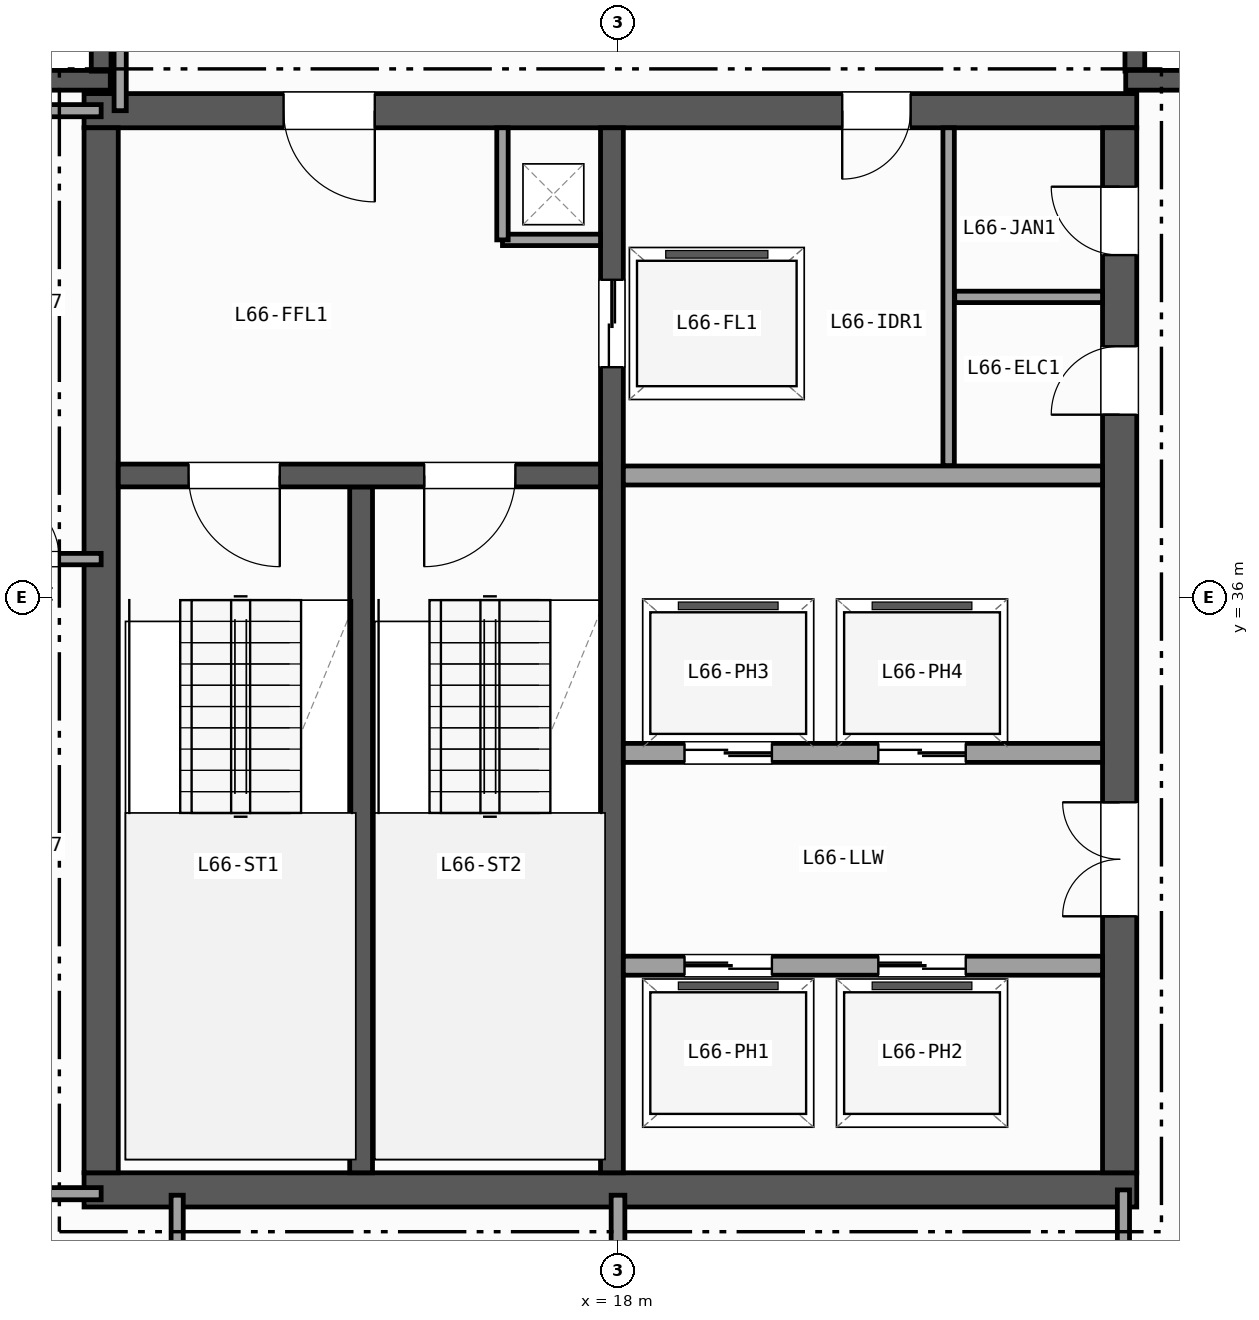
"""IFC4 building model, lengths in metres.
Left out: names, types, materials, properties, quantities, classifications, styles, units other than length and angle.
Written with IfcOpenShell. Run it as: python <this file> out.ifc"""

import sys

from ifc_helpers import new_model, si_unit, direction, frame, frame_2d, origin, place, context, subcontext, project, spatial, rectangle, extrude, element, fill, save


model = new_model("IFC4")
c1 = context("Model", 3, precision=1e-05, world=origin(), true_north=direction((0.0, 1.0)))
c2 = subcontext(c1, "Body", "Model", "MODEL_VIEW")
j1 = project(units=[si_unit("LENGTHUNIT", "METRE"), si_unit("PLANEANGLEUNIT", "RADIAN")], contexts=[c1])
p1 = place(None, origin())
s1 = spatial("IfcSite", under=j1, at=p1, CompositionType="ELEMENT")
p2 = place(p1, origin())
s2 = spatial("IfcBuilding", under=s1, at=p2, CompositionType="ELEMENT")
p3 = place(p2, frame((0.0, 0.0, 263.0)))
s3 = spatial("IfcBuildingStorey", under=s2, at=p3, CompositionType="ELEMENT", Elevation=263.0)
p4 = place(p3, frame((9.0, 42.8, 0.0), z_axis=(0.0, 0.0, 1.0), x_axis=(1.0, 0.0, 0.0)))
e1 = element("IfcWall", 1, at=p4, inside=s3, PredefinedType="SOLIDWALL", context=c2, shape_type="SweptSolid", body=[
    extrude(rectangle(XDim=2.32, YDim=0.26, at=frame_2d((1.16, 0.0))), origin(), (0.0, 0.0, 1.0), 3.42),
])
for number, where, z_axis, x_axis in (
    (2, (11.2, 42.92, 0.0), (0.0, 0.0, 1.0), (0.0, 1.0, 0.0)),
    (3, (24.8, 45.0, 0.0), (0.0, 0.0, 1.0), (0.0, -1.0, 0.0)),
):
    element("IfcWall", number, at=place(p3, frame(where, z_axis=z_axis, x_axis=x_axis)), inside=s3, PredefinedType="SOLIDWALL", context=c2, shape_type="SweptSolid", body=[
        extrude(rectangle(XDim=2.08, YDim=0.26, at=frame_2d((1.04, 0.0))), origin(), (0.0, 0.0, 1.0), 3.42),
    ])
p5 = place(p3, frame((24.68, 42.8, 0.0), z_axis=(0.0, 0.0, 1.0), x_axis=(1.0, 0.0, 0.0)))
e4 = element("IfcWall", 4, at=p5, inside=s3, PredefinedType="SOLIDWALL", context=c2, shape_type="SweptSolid", body=[
    extrude(rectangle(XDim=2.32, YDim=0.26, at=frame_2d((1.16, 0.0))), origin(), (0.0, 0.0, 1.0), 3.42),
])
p6 = place(p3, frame((10.975, 28.2, 0.0), z_axis=(0.0, 0.0, 1.0), x_axis=(1.0, 0.0, 0.0)))
e5 = element("IfcWall", 5, at=p6, inside=s3, PredefinedType="SHEAR", context=c2, shape_type="SweptSolid", body=[
    extrude(rectangle(XDim=13.85, YDim=0.45, at=frame_2d((6.925, 0.0))), origin(), (0.0, 0.0, 1.0), 3.42),
])
p7 = place(p3, frame((24.825, 42.4, 0.0), z_axis=(0.0, 0.0, 1.0), x_axis=(-1.0, 0.0, 0.0)))
e6 = element("IfcWall", 6, at=p7, inside=s3, PredefinedType="SHEAR", context=c2, shape_type="SweptSolid", body=[
    extrude(rectangle(XDim=13.85, YDim=0.45, at=frame_2d((6.925, 0.0))), origin(), (0.0, 0.0, 1.0), 3.42),
])
p8 = place(p7, frame((10.025, 0.0, 0.0)))
e7 = element("IfcOpeningElement", 7, at=p8, cuts=e6, PredefinedType="OPENING", context=c2, shape_type="SweptSolid", body=[
    extrude(rectangle(XDim=1.2, YDim=2.15, at=frame_2d((0.6, 1.075))), frame((0.0, 0.235, 0.0), z_axis=(0.0, -1.0, 0.0), x_axis=(1.0, 0.0, 0.0)), (0.0, 0.0, 1.0), 0.47),
])
p9 = place(p7, frame((2.975, 0.0, 0.0)))
e8 = element("IfcOpeningElement", 8, at=p9, cuts=e6, PredefinedType="OPENING", context=c2, shape_type="SweptSolid", body=[
    extrude(rectangle(XDim=0.9, YDim=2.1, at=frame_2d((0.45, 1.05))), frame((0.0, 0.235, 0.0), z_axis=(0.0, -1.0, 0.0), x_axis=(1.0, 0.0, 0.0)), (0.0, 0.0, 1.0), 0.47),
])
p10 = place(p3, frame((11.2, 42.175, 0.0), z_axis=(0.0, 0.0, 1.0), x_axis=(0.0, -1.0, 0.0)))
e9 = element("IfcWall", 9, at=p10, inside=s3, PredefinedType="SHEAR", context=c2, shape_type="SweptSolid", body=[
    extrude(rectangle(XDim=13.75, YDim=0.45, at=frame_2d((6.875, 0.0))), origin(), (0.0, 0.0, 1.0), 3.42),
])
p11 = place(p3, frame((24.6, 28.425, 0.0), z_axis=(0.0, 0.0, 1.0), x_axis=(0.0, 1.0, 0.0)))
e10 = element("IfcWall", 10, at=p11, inside=s3, PredefinedType="SHEAR", context=c2, shape_type="SweptSolid", body=[
    extrude(rectangle(XDim=13.75, YDim=0.45, at=frame_2d((6.875, 0.0))), origin(), (0.0, 0.0, 1.0), 3.42),
])
p12 = place(p11, frame((3.375, 0.0, 0.0)))
e11 = element("IfcOpeningElement", 11, at=p12, cuts=e10, PredefinedType="OPENING", context=c2, shape_type="SweptSolid", body=[
    extrude(rectangle(XDim=1.5, YDim=2.2, at=frame_2d((0.75, 1.1))), frame((0.0, 0.235, 0.0), z_axis=(0.0, -1.0, 0.0), x_axis=(1.0, 0.0, 0.0)), (0.0, 0.0, 1.0), 0.47),
])
p13 = place(p11, frame((9.975, 0.0, 0.0)))
e12 = element("IfcOpeningElement", 12, at=p13, cuts=e10, PredefinedType="OPENING", context=c2, shape_type="SweptSolid", body=[
    extrude(rectangle(XDim=0.9, YDim=2.1, at=frame_2d((0.45, 1.05))), frame((0.0, 0.235, 0.0), z_axis=(0.0, -1.0, 0.0), x_axis=(1.0, 0.0, 0.0)), (0.0, 0.0, 1.0), 0.47),
])
p14 = place(p11, frame((12.075, 0.0, 0.0)))
e13 = element("IfcOpeningElement", 13, at=p14, cuts=e10, PredefinedType="OPENING", context=c2, shape_type="SweptSolid", body=[
    extrude(rectangle(XDim=0.9, YDim=2.1, at=frame_2d((0.45, 1.05))), frame((0.0, 0.235, 0.0), z_axis=(0.0, -1.0, 0.0), x_axis=(1.0, 0.0, 0.0)), (0.0, 0.0, 1.0), 0.47),
])
p15 = place(p3, frame((14.62, 28.425, 0.0), z_axis=(0.0, 0.0, 1.0), x_axis=(0.0, 1.0, 0.0)))
e14 = element("IfcWall", 14, at=p15, inside=s3, PredefinedType="SHEAR", context=c2, shape_type="SweptSolid", body=[
    extrude(rectangle(XDim=9.025, YDim=0.3, at=frame_2d((4.512, 0.0))), origin(), (0.0, 0.0, 1.0), 3.42),
])
p16 = place(p3, frame((17.92, 42.175, 0.0), z_axis=(0.0, 0.0, 1.0), x_axis=(0.0, -1.0, 0.0)))
e15 = element("IfcWall", 15, at=p16, inside=s3, PredefinedType="SHEAR", context=c2, shape_type="SweptSolid", body=[
    extrude(rectangle(XDim=13.75, YDim=0.3, at=frame_2d((6.875, 0.0))), origin(), (0.0, 0.0, 1.0), 3.42),
])
p17 = place(p16, frame((2.0, 0.0, 0.0)))
e16 = element("IfcOpeningElement", 16, at=p17, cuts=e15, PredefinedType="OPENING", context=c2, shape_type="SweptSolid", body=[
    extrude(rectangle(XDim=1.15, YDim=2.15, at=frame_2d((0.575, 1.075))), frame((0.0, 0.16, 0.0), z_axis=(0.0, -1.0, 0.0), x_axis=(1.0, 0.0, 0.0)), (0.0, 0.0, 1.0), 0.32),
])
p18 = place(p3, frame((17.77, 37.6, 0.0), z_axis=(0.0, 0.0, 1.0), x_axis=(-1.0, 0.0, 0.0)))
e17 = element("IfcWall", 17, at=p18, inside=s3, PredefinedType="SHEAR", context=c2, shape_type="SweptSolid", body=[
    extrude(rectangle(XDim=6.345, YDim=0.3, at=frame_2d((3.172, 0.0))), origin(), (0.0, 0.0, 1.0), 3.42),
])
p19 = place(p18, frame((4.22, 0.0, 0.0)))
e18 = element("IfcOpeningElement", 18, at=p19, cuts=e17, PredefinedType="OPENING", context=c2, shape_type="SweptSolid", body=[
    extrude(rectangle(XDim=1.2, YDim=2.15, at=frame_2d((0.6, 1.075))), frame((0.0, 0.16, 0.0), z_axis=(0.0, -1.0, 0.0), x_axis=(1.0, 0.0, 0.0)), (0.0, 0.0, 1.0), 0.32),
])
p20 = place(p18, frame((1.12, 0.0, 0.0)))
e19 = element("IfcOpeningElement", 19, at=p20, cuts=e17, PredefinedType="OPENING", context=c2, shape_type="SweptSolid", body=[
    extrude(rectangle(XDim=1.2, YDim=2.15, at=frame_2d((0.6, 1.075))), frame((0.0, 0.16, 0.0), z_axis=(0.0, -1.0, 0.0), x_axis=(1.0, 0.0, 0.0)), (0.0, 0.0, 1.0), 0.32),
])
p21 = place(p3, frame((16.48, 40.7, 0.0), z_axis=(0.0, 0.0, 1.0), x_axis=(1.0, 0.0, 0.0)))
e20 = element("IfcWall", 20, at=p21, inside=s3, PredefinedType="PARTITIONING", context=c2, shape_type="SweptSolid", body=[
    extrude(rectangle(XDim=1.29, YDim=0.15, at=frame_2d((0.645, 0.0))), origin(), (0.0, 0.0, 1.0), 3.42),
])
p22 = place(p3, frame((16.48, 40.7, 0.0), z_axis=(0.0, 0.0, 1.0), x_axis=(0.0, 1.0, 0.0)))
e21 = element("IfcWall", 21, at=p22, inside=s3, PredefinedType="PARTITIONING", context=c2, shape_type="SweptSolid", body=[
    extrude(rectangle(XDim=1.475, YDim=0.15, at=frame_2d((0.738, 0.0))), origin(), (0.0, 0.0, 1.0), 3.42),
])
p23 = place(p3, frame((18.07, 37.6, 0.0), z_axis=(0.0, 0.0, 1.0), x_axis=(1.0, 0.0, 0.0)))
e22 = element("IfcWall", 22, at=p23, inside=s3, PredefinedType="PARTITIONING", context=c2, shape_type="SweptSolid", body=[
    extrude(rectangle(XDim=6.305, YDim=0.25, at=frame_2d((3.152, 0.0))), origin(), (0.0, 0.0, 1.0), 3.42),
])
p24 = place(p3, frame((18.07, 31.15, 0.0), z_axis=(0.0, 0.0, 1.0), x_axis=(1.0, 0.0, 0.0)))
e23 = element("IfcWall", 23, at=p24, inside=s3, PredefinedType="PARTITIONING", context=c2, shape_type="SweptSolid", body=[
    extrude(rectangle(XDim=6.305, YDim=0.25, at=frame_2d((3.152, 0.0))), origin(), (0.0, 0.0, 1.0), 3.42),
])
p25 = place(p24, frame((0.805, 0.0, 0.0)))
e24 = element("IfcOpeningElement", 24, at=p25, cuts=e23, PredefinedType="OPENING", context=c2, shape_type="SweptSolid", body=[
    extrude(rectangle(XDim=1.15, YDim=2.15, at=frame_2d((0.575, 1.075))), frame((0.0, 0.135, 0.0), z_axis=(0.0, -1.0, 0.0), x_axis=(1.0, 0.0, 0.0)), (0.0, 0.0, 1.0), 0.27),
])
p26 = place(p24, frame((3.355, 0.0, 0.0)))
e25 = element("IfcOpeningElement", 25, at=p26, cuts=e23, PredefinedType="OPENING", context=c2, shape_type="SweptSolid", body=[
    extrude(rectangle(XDim=1.15, YDim=2.15, at=frame_2d((0.575, 1.075))), frame((0.0, 0.135, 0.0), z_axis=(0.0, -1.0, 0.0), x_axis=(1.0, 0.0, 0.0)), (0.0, 0.0, 1.0), 0.27),
])
p27 = place(p3, frame((24.375, 33.95, 0.0), z_axis=(0.0, 0.0, 1.0), x_axis=(-1.0, 0.0, 0.0)))
e26 = element("IfcWall", 26, at=p27, inside=s3, PredefinedType="PARTITIONING", context=c2, shape_type="SweptSolid", body=[
    extrude(rectangle(XDim=6.305, YDim=0.25, at=frame_2d((3.152, 0.0))), origin(), (0.0, 0.0, 1.0), 3.42),
])
p28 = place(p27, frame((4.35, 0.0, 0.0)))
e27 = element("IfcOpeningElement", 27, at=p28, cuts=e26, PredefinedType="OPENING", context=c2, shape_type="SweptSolid", body=[
    extrude(rectangle(XDim=1.15, YDim=2.15, at=frame_2d((0.575, 1.075))), frame((0.0, 0.135, 0.0), z_axis=(0.0, -1.0, 0.0), x_axis=(1.0, 0.0, 0.0)), (0.0, 0.0, 1.0), 0.27),
])
p29 = place(p27, frame((1.8, 0.0, 0.0)))
e28 = element("IfcOpeningElement", 28, at=p29, cuts=e26, PredefinedType="OPENING", context=c2, shape_type="SweptSolid", body=[
    extrude(rectangle(XDim=1.15, YDim=2.15, at=frame_2d((0.575, 1.075))), frame((0.0, 0.135, 0.0), z_axis=(0.0, -1.0, 0.0), x_axis=(1.0, 0.0, 0.0)), (0.0, 0.0, 1.0), 0.27),
])
p30 = place(p3, frame((22.35, 37.73, 0.0), z_axis=(0.0, 0.0, 1.0), x_axis=(0.0, 1.0, 0.0)))
e29 = element("IfcWall", 29, at=p30, inside=s3, PredefinedType="PARTITIONING", context=c2, shape_type="SweptSolid", body=[
    extrude(rectangle(XDim=4.445, YDim=0.15, at=frame_2d((2.223, 0.0))), origin(), (0.0, 0.0, 1.0), 3.42),
])
p31 = place(p3, frame((22.43, 39.95, 0.0), z_axis=(0.0, 0.0, 1.0), x_axis=(1.0, 0.0, 0.0)))
e30 = element("IfcWall", 30, at=p31, inside=s3, PredefinedType="PARTITIONING", context=c2, shape_type="SweptSolid", body=[
    extrude(rectangle(XDim=1.945, YDim=0.15, at=frame_2d((0.973, 0.0))), origin(), (0.0, 0.0, 1.0), 3.42),
])
p32 = place(p3, frame((9.0, 28.15, 0.0), z_axis=(0.0, 0.0, 1.0), x_axis=(1.0, 0.0, 0.0)))
e31 = element("IfcWall", 31, at=p32, inside=s3, PredefinedType="PARTITIONING", context=c2, shape_type="SweptSolid", body=[
    extrude(rectangle(XDim=2.2, YDim=0.16, at=frame_2d((1.1, 0.0))), origin(), (0.0, 0.0, 1.0), 2.707),
])
p33 = place(p32, frame((0.45, 0.0, 0.0)))
e32 = element("IfcOpeningElement", 32, at=p33, cuts=e31, PredefinedType="OPENING", context=c2, shape_type="SweptSolid", body=[
    extrude(rectangle(XDim=0.86, YDim=2.05, at=frame_2d((0.43, 1.025))), frame((0.0, 0.09, 0.0), z_axis=(0.0, -1.0, 0.0), x_axis=(1.0, 0.0, 0.0)), (0.0, 0.0, 1.0), 0.18),
])
p34 = place(p3, frame((8.761, 42.4, 0.0), z_axis=(0.0, 0.0, 1.0), x_axis=(1.0, 0.0, 0.0)))
e33 = element("IfcWall", 33, at=p34, inside=s3, PredefinedType="PARTITIONING", context=c2, shape_type="SweptSolid", body=[
    extrude(rectangle(XDim=2.439, YDim=0.16, at=frame_2d((1.219, 0.0))), origin(), (0.0, 0.0, 1.0), 3.42),
])
p35 = place(p3, frame((11.45, 42.4, 0.0), z_axis=(0.0, 0.0, 1.0), x_axis=(0.0, 1.0, 0.0)))
e34 = element("IfcWall", 34, at=p35, inside=s3, PredefinedType="PARTITIONING", context=c2, shape_type="SweptSolid", body=[
    extrude(rectangle(XDim=2.666, YDim=0.16, at=frame_2d((1.333, 0.0))), origin(), (0.0, 0.0, 1.0), 3.42),
])
p36 = place(p3, frame((9.0, 36.5, 0.0), z_axis=(0.0, 0.0, 1.0), x_axis=(1.0, 0.0, 0.0)))
e35 = element("IfcWall", 35, at=p36, inside=s3, PredefinedType="PARTITIONING", context=c2, shape_type="SweptSolid", body=[
    extrude(rectangle(XDim=2.2, YDim=0.15, at=frame_2d((1.1, 0.0))), origin(), (0.0, 0.0, 1.0), 3.42),
])
p37 = place(p36, frame((0.75, 0.0, 0.0)))
e36 = element("IfcOpeningElement", 36, at=p37, cuts=e35, PredefinedType="OPENING", context=c2, shape_type="SweptSolid", body=[
    extrude(rectangle(XDim=0.9, YDim=2.1, at=frame_2d((0.45, 1.05))), frame((0.0, 0.085, 0.0), z_axis=(0.0, -1.0, 0.0), x_axis=(1.0, 0.0, 0.0)), (0.0, 0.0, 1.0), 0.17),
])
p38 = place(p3, frame((24.65, 9.0, 0.0), z_axis=(0.0, 0.0, 1.0), x_axis=(0.0, 1.0, 0.0)))
e37 = element("IfcWall", 37, at=p38, inside=s3, PredefinedType="PARTITIONING", context=c2, shape_type="SweptSolid", body=[
    extrude(rectangle(XDim=19.2, YDim=0.16, at=frame_2d((9.6, 0.0))), origin(), (0.0, 0.0, 1.0), 2.707),
])
p39 = place(p38, frame((8.6, 0.0, 0.0)))
e38 = element("IfcOpeningElement", 38, at=p39, cuts=e37, PredefinedType="OPENING", context=c2, shape_type="SweptSolid", body=[
    extrude(rectangle(XDim=1.0, YDim=2.1, at=frame_2d((0.5, 1.05))), frame((0.0, 0.09, 0.0), z_axis=(0.0, -1.0, 0.0), x_axis=(1.0, 0.0, 0.0)), (0.0, 0.0, 1.0), 0.18),
])
p40 = place(p38, frame((2.55, 0.0, 0.0)))
e39 = element("IfcOpeningElement", 39, at=p40, cuts=e37, PredefinedType="OPENING", context=c2, shape_type="SweptSolid", body=[
    extrude(rectangle(XDim=1.05, YDim=2.15, at=frame_2d((0.525, 1.075))), frame((0.0, 0.09, 0.0), z_axis=(0.0, -1.0, 0.0), x_axis=(1.0, 0.0, 0.0)), (0.0, 0.0, 1.0), 0.18),
])
p41 = place(p3, frame((18.0, 15.8, 0.0), z_axis=(0.0, 0.0, 1.0), x_axis=(0.0, 1.0, 0.0)))
e40 = element("IfcWall", 40, at=p41, inside=s3, PredefinedType="PARTITIONING", context=c2, shape_type="SweptSolid", body=[
    extrude(rectangle(XDim=12.33, YDim=0.18, at=frame_2d((6.165, 0.0))), origin(), (0.0, 0.0, 1.0), 2.789),
])
p42 = place(p41, frame((5.7, 0.0, 0.0)))
e41 = element("IfcOpeningElement", 41, at=p42, cuts=e40, PredefinedType="OPENING", context=c2, shape_type="SweptSolid", body=[
    extrude(rectangle(XDim=1.2, YDim=2.15, at=frame_2d((0.6, 1.075))), frame((0.0, 0.1, 0.0), z_axis=(0.0, -1.0, 0.0), x_axis=(1.0, 0.0, 0.0)), (0.0, 0.0, 1.0), 0.2),
])
p43 = place(p3, frame((12.2, 18.0, 0.0), z_axis=(0.0, 0.0, 1.0), x_axis=(0.0, 1.0, 0.0)))
e42 = element("IfcWall", 42, at=p43, inside=s3, PredefinedType="PARTITIONING", context=c2, shape_type="SweptSolid", body=[
    extrude(rectangle(XDim=10.13, YDim=0.16, at=frame_2d((5.065, 0.0))), origin(), (0.0, 0.0, 1.0), 2.789),
])
p44 = place(p43, frame((2.5, 0.0, 0.0)))
e43 = element("IfcOpeningElement", 43, at=p44, cuts=e42, PredefinedType="OPENING", context=c2, shape_type="SweptSolid", body=[
    extrude(rectangle(XDim=0.86, YDim=2.05, at=frame_2d((0.43, 1.025))), frame((0.0, 0.09, 0.0), z_axis=(0.0, -1.0, 0.0), x_axis=(1.0, 0.0, 0.0)), (0.0, 0.0, 1.0), 0.18),
])
p45 = place(p19, origin())
e44 = element("IfcDoor", 44, at=p45, inside=s3, OperationType="SINGLE_SWING_LEFT", PredefinedType="DOOR", context=c2, shape_type="SweptSolid", body=[
    extrude(rectangle(XDim=1.2, YDim=2.15, at=frame_2d((0.6, 1.075))), frame((0.0, 0.025, 0.0), z_axis=(0.0, -1.0, 0.0), x_axis=(1.0, 0.0, 0.0)), (0.0, 0.0, 1.0), 0.05),
])
fill(e18, e44)
p46 = place(p20, origin())
e45 = element("IfcDoor", 45, at=p46, inside=s3, OperationType="SINGLE_SWING_RIGHT", PredefinedType="DOOR", context=c2, shape_type="SweptSolid", body=[
    extrude(rectangle(XDim=1.2, YDim=2.15, at=frame_2d((0.6, 1.075))), frame((0.0, 0.025, 0.0), z_axis=(0.0, -1.0, 0.0), x_axis=(1.0, 0.0, 0.0)), (0.0, 0.0, 1.0), 0.05),
])
fill(e19, e45)
p47 = place(p12, origin())
e46 = element("IfcDoor", 46, at=p47, inside=s3, OperationType="DOUBLE_DOOR_SINGLE_SWING", PredefinedType="DOOR", context=c2, shape_type="SweptSolid", body=[
    extrude(rectangle(XDim=1.5, YDim=2.2, at=frame_2d((0.75, 1.1))), frame((0.0, 0.025, 0.0), z_axis=(0.0, -1.0, 0.0), x_axis=(1.0, 0.0, 0.0)), (0.0, 0.0, 1.0), 0.05),
])
fill(e11, e46)
p48 = place(p8, origin())
e47 = element("IfcDoor", 47, at=p48, inside=s3, OperationType="SINGLE_SWING_LEFT", PredefinedType="DOOR", context=c2, shape_type="SweptSolid", body=[
    extrude(rectangle(XDim=1.2, YDim=2.15, at=frame_2d((0.6, 1.075))), frame((0.0, 0.025, 0.0), z_axis=(0.0, -1.0, 0.0), x_axis=(1.0, 0.0, 0.0)), (0.0, 0.0, 1.0), 0.05),
])
fill(e7, e47)
p49 = place(p13, origin())
e48 = element("IfcDoor", 48, at=p49, inside=s3, OperationType="SINGLE_SWING_LEFT", PredefinedType="DOOR", context=c2, shape_type="SweptSolid", body=[
    extrude(rectangle(XDim=0.9, YDim=2.1, at=frame_2d((0.45, 1.05))), frame((0.0, 0.025, 0.0), z_axis=(0.0, -1.0, 0.0), x_axis=(1.0, 0.0, 0.0)), (0.0, 0.0, 1.0), 0.05),
])
fill(e12, e48)
p50 = place(p9, origin())
e49 = element("IfcDoor", 49, at=p50, inside=s3, OperationType="SINGLE_SWING_RIGHT", PredefinedType="DOOR", context=c2, shape_type="SweptSolid", body=[
    extrude(rectangle(XDim=0.9, YDim=2.1, at=frame_2d((0.45, 1.05))), frame((0.0, 0.025, 0.0), z_axis=(0.0, -1.0, 0.0), x_axis=(1.0, 0.0, 0.0)), (0.0, 0.0, 1.0), 0.05),
])
fill(e8, e49)
p51 = place(p14, origin())
e50 = element("IfcDoor", 50, at=p51, inside=s3, OperationType="SINGLE_SWING_RIGHT", PredefinedType="DOOR", context=c2, shape_type="SweptSolid", body=[
    extrude(rectangle(XDim=0.9, YDim=2.1, at=frame_2d((0.45, 1.05))), frame((0.0, 0.025, 0.0), z_axis=(0.0, -1.0, 0.0), x_axis=(1.0, 0.0, 0.0)), (0.0, 0.0, 1.0), 0.05),
])
fill(e13, e50)
p52 = place(p17, origin())
e51 = element("IfcDoor", 51, at=p52, inside=s3, OperationType="DOUBLE_DOOR_SLIDING", PredefinedType="DOOR", context=c2, shape_type="SweptSolid", body=[
    extrude(rectangle(XDim=1.15, YDim=2.15, at=frame_2d((0.575, 1.075))), frame((0.0, 0.025, 0.0), z_axis=(0.0, -1.0, 0.0), x_axis=(1.0, 0.0, 0.0)), (0.0, 0.0, 1.0), 0.05),
])
fill(e16, e51)
p53 = place(p25, origin())
e52 = element("IfcDoor", 52, at=p53, inside=s3, OperationType="DOUBLE_DOOR_SLIDING", PredefinedType="DOOR", context=c2, shape_type="SweptSolid", body=[
    extrude(rectangle(XDim=1.15, YDim=2.15, at=frame_2d((0.575, 1.075))), frame((0.0, 0.025, 0.0), z_axis=(0.0, -1.0, 0.0), x_axis=(1.0, 0.0, 0.0)), (0.0, 0.0, 1.0), 0.05),
])
fill(e24, e52)
p54 = place(p26, origin())
e53 = element("IfcDoor", 53, at=p54, inside=s3, OperationType="DOUBLE_DOOR_SLIDING", PredefinedType="DOOR", context=c2, shape_type="SweptSolid", body=[
    extrude(rectangle(XDim=1.15, YDim=2.15, at=frame_2d((0.575, 1.075))), frame((0.0, 0.025, 0.0), z_axis=(0.0, -1.0, 0.0), x_axis=(1.0, 0.0, 0.0)), (0.0, 0.0, 1.0), 0.05),
])
fill(e25, e53)
p55 = place(p28, origin())
e54 = element("IfcDoor", 54, at=p55, inside=s3, OperationType="DOUBLE_DOOR_SLIDING", PredefinedType="DOOR", context=c2, shape_type="SweptSolid", body=[
    extrude(rectangle(XDim=1.15, YDim=2.15, at=frame_2d((0.575, 1.075))), frame((0.0, 0.025, 0.0), z_axis=(0.0, -1.0, 0.0), x_axis=(1.0, 0.0, 0.0)), (0.0, 0.0, 1.0), 0.05),
])
fill(e27, e54)
p56 = place(p29, origin())
e55 = element("IfcDoor", 55, at=p56, inside=s3, OperationType="DOUBLE_DOOR_SLIDING", PredefinedType="DOOR", context=c2, shape_type="SweptSolid", body=[
    extrude(rectangle(XDim=1.15, YDim=2.15, at=frame_2d((0.575, 1.075))), frame((0.0, 0.025, 0.0), z_axis=(0.0, -1.0, 0.0), x_axis=(1.0, 0.0, 0.0)), (0.0, 0.0, 1.0), 0.05),
])
fill(e28, e55)
p57 = place(p37, origin())
e56 = element("IfcDoor", 56, at=p57, inside=s3, OperationType="SINGLE_SWING_LEFT", PredefinedType="DOOR", context=c2, shape_type="SweptSolid", body=[
    extrude(rectangle(XDim=0.9, YDim=2.1, at=frame_2d((0.45, 1.05))), frame((0.0, 0.025, 0.0), z_axis=(0.0, -1.0, 0.0), x_axis=(1.0, 0.0, 0.0)), (0.0, 0.0, 1.0), 0.05),
])
fill(e36, e56)
save(model, sys.argv[1])
